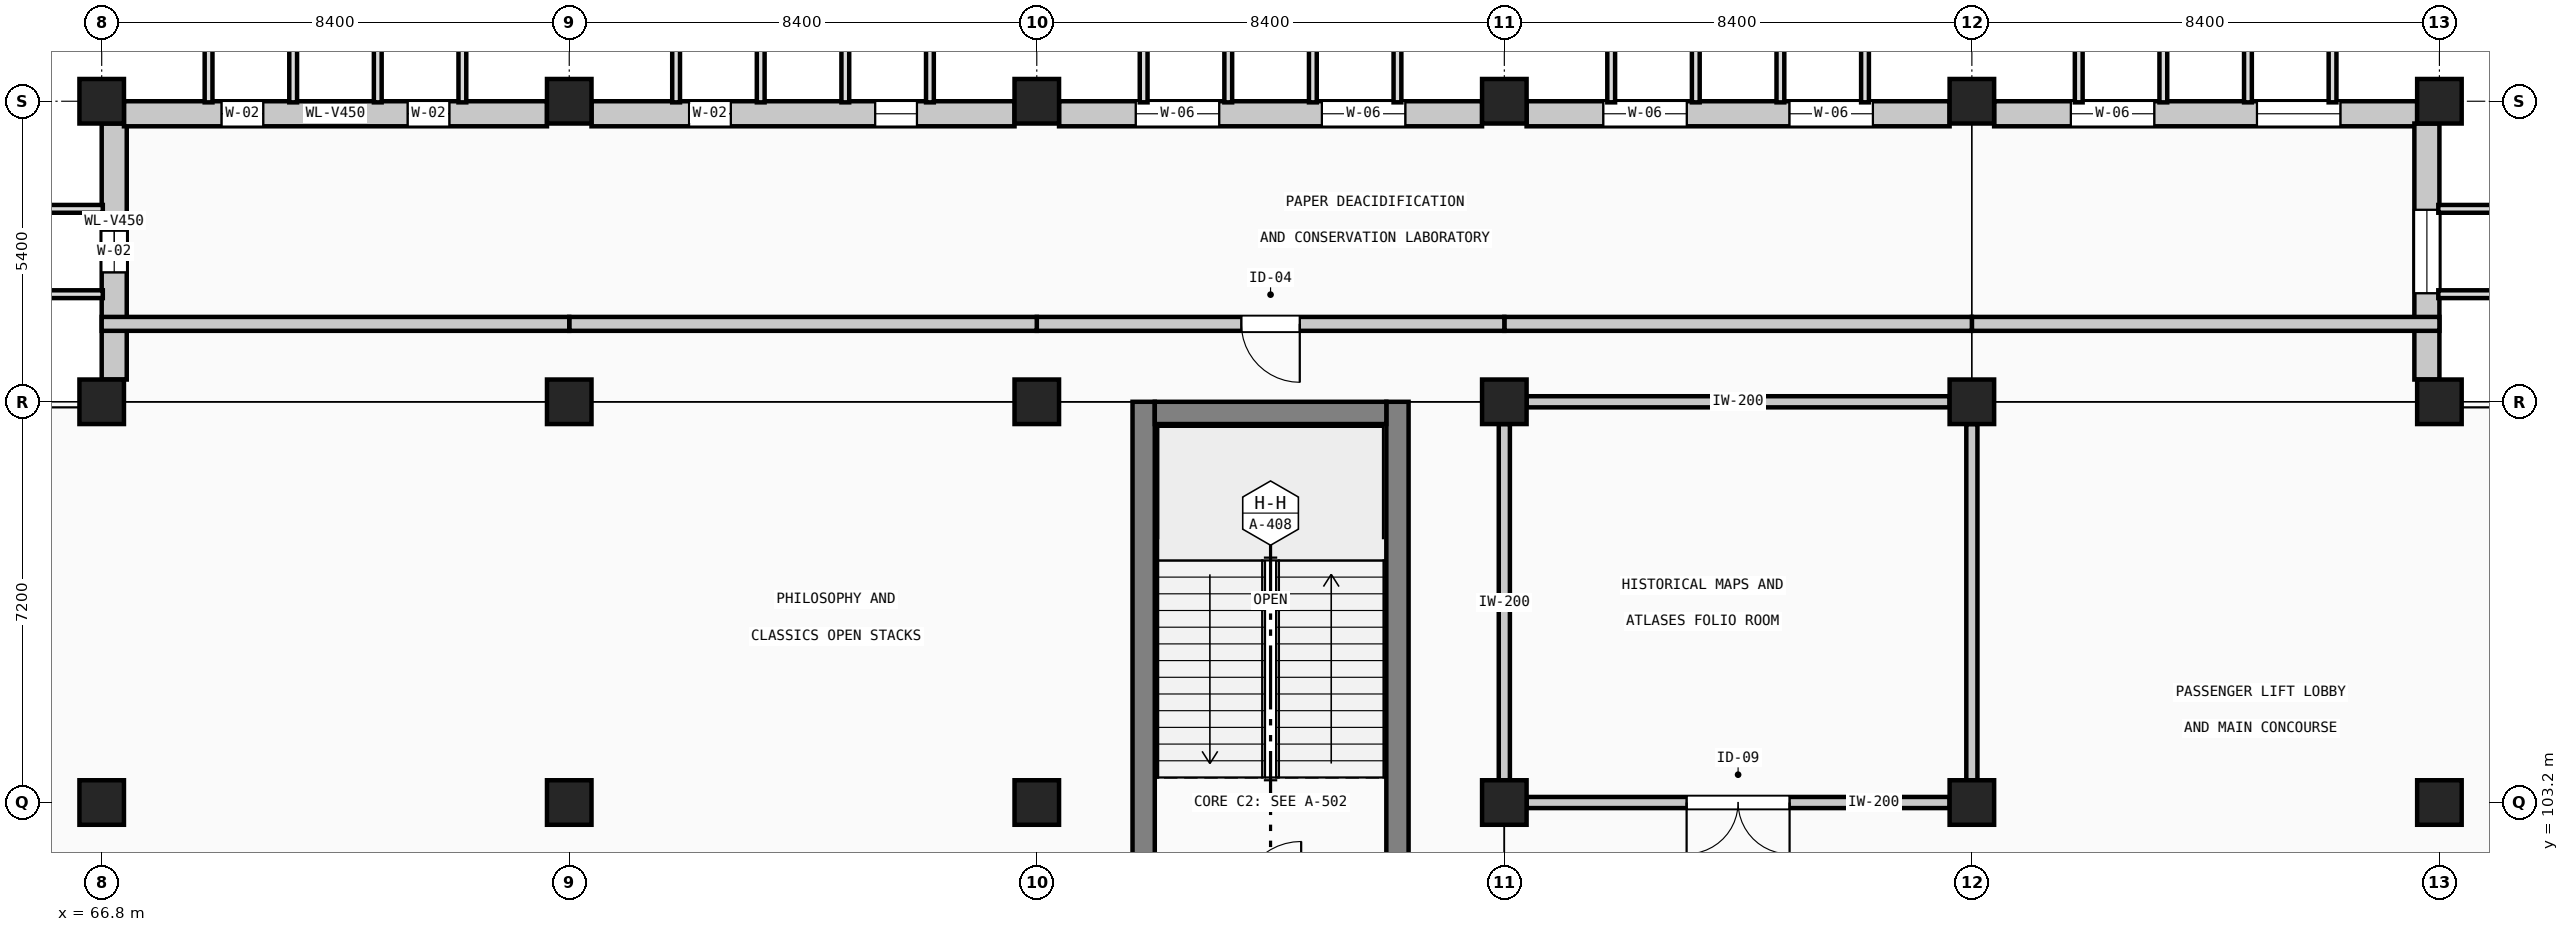
"""IFC4 building model, lengths in metres.
Left out: names, types, materials, properties, quantities, classifications, styles, units other than length and angle.
Written with IfcOpenShell. Run it as: python <this file> out.ifc"""

import sys

from ifc_helpers import new_model, si_unit, direction, frame, frame_2d, origin, origin_2d, place, context, subcontext, project, spatial, rectangle, extrude, element, fill, save


model = new_model("IFC4")
c1 = context("Model", 3, precision=1e-05, world=origin(), true_north=direction((0.0, 1.0)))
c2 = subcontext(c1, "Body", "Model", "MODEL_VIEW")
j1 = project(units=[si_unit("LENGTHUNIT", "METRE"), si_unit("PLANEANGLEUNIT", "RADIAN")], contexts=[c1])
p1 = place(None, origin())
s1 = spatial("IfcSite", under=j1, at=p1, CompositionType="ELEMENT")
p2 = place(p1, origin())
s2 = spatial("IfcBuilding", under=s1, at=p2, CompositionType="ELEMENT")
p3 = place(p2, frame((0.0, 0.0, 14.4)))
s3 = spatial("IfcBuildingStorey", under=s2, at=p3, CompositionType="ELEMENT", Elevation=14.4)
for number, where, z_axis, x_axis in (
    (1, (66.8, 103.2, 0.0), (0.0, 0.0, 1.0), (1.0, 0.0, 0.0)),
    (2, (66.8, 110.4, 0.0), (0.0, 0.0, 1.0), (1.0, 0.0, 0.0)),
    (3, (66.8, 115.8, 0.0), (0.0, 0.0, 1.0), (1.0, 0.0, 0.0)),
    (4, (75.2, 103.2, 0.0), (0.0, 0.0, 1.0), (1.0, 0.0, 0.0)),
    (5, (75.2, 110.4, 0.0), (0.0, 0.0, 1.0), (1.0, 0.0, 0.0)),
    (6, (75.2, 115.8, 0.0), (0.0, 0.0, 1.0), (1.0, 0.0, 0.0)),
    (7, (83.6, 103.2, 0.0), (0.0, 0.0, 1.0), (1.0, 0.0, 0.0)),
    (8, (83.6, 110.4, 0.0), (0.0, 0.0, 1.0), (1.0, 0.0, 0.0)),
    (9, (83.6, 115.8, 0.0), (0.0, 0.0, 1.0), (1.0, 0.0, 0.0)),
    (10, (92.0, 103.2, 0.0), (0.0, 0.0, 1.0), (1.0, 0.0, 0.0)),
    (11, (92.0, 110.4, 0.0), (0.0, 0.0, 1.0), (1.0, 0.0, 0.0)),
    (12, (92.0, 115.8, 0.0), (0.0, 0.0, 1.0), (1.0, 0.0, 0.0)),
    (13, (100.4, 103.2, 0.0), (0.0, 0.0, 1.0), (1.0, 0.0, 0.0)),
    (14, (100.4, 110.4, 0.0), (0.0, 0.0, 1.0), (1.0, 0.0, 0.0)),
    (15, (100.4, 115.8, 0.0), (0.0, 0.0, 1.0), (1.0, 0.0, 0.0)),
    (16, (108.8, 103.2, 0.0), (0.0, 0.0, 1.0), (1.0, 0.0, 0.0)),
    (17, (108.8, 110.4, 0.0), (0.0, 0.0, 1.0), (1.0, 0.0, 0.0)),
    (18, (108.8, 115.8, 0.0), (0.0, 0.0, 1.0), (1.0, 0.0, 0.0)),
):
    element("IfcColumn", number, at=place(p3, frame(where, z_axis=z_axis, x_axis=x_axis)), inside=s3, PredefinedType="COLUMN", context=c2, shape_type="SweptSolid", body=[
        extrude(rectangle(XDim=0.8, YDim=0.8, at=origin_2d()), origin(), (0.0, 0.0, 1.0), 4.48),
    ])
for number, where, z_axis, x_axis in (
    (19, (85.52, 101.2, 0.0), (0.0, 0.0, 1.0), (0.0, 1.0, 0.0)),
    (20, (90.08, 110.4, 0.0), (0.0, 0.0, 1.0), (0.0, -1.0, 0.0)),
):
    element("IfcWall", number, at=place(p3, frame(where, z_axis=z_axis, x_axis=x_axis)), inside=s3, PredefinedType="SHEAR", context=c2, shape_type="SweptSolid", body=[
        extrude(rectangle(XDim=9.2, YDim=0.4, at=frame_2d((4.6, 0.0))), origin(), (0.0, 0.0, 1.0), 4.18),
    ])
p4 = place(p3, frame((85.72, 110.2, 0.0), z_axis=(0.0, 0.0, 1.0), x_axis=(1.0, 0.0, 0.0)))
e21 = element("IfcWall", 21, at=p4, inside=s3, PredefinedType="SHEAR", context=c2, shape_type="SweptSolid", body=[
    extrude(rectangle(XDim=4.16, YDim=0.4, at=frame_2d((2.08, 0.0))), origin(), (0.0, 0.0, 1.0), 4.18),
])
p5 = place(p3, frame((67.025, 110.8, 0.0), z_axis=(0.0, 0.0, 1.0), x_axis=(0.0, 1.0, 0.0)))
e22 = element("IfcWall", 22, at=p5, inside=s3, PredefinedType="SOLIDWALL", context=c2, shape_type="SweptSolid", body=[
    extrude(rectangle(XDim=4.6, YDim=0.45, at=frame_2d((2.3, 0.0))), origin(), (0.0, 0.0, 1.0), 4.23),
])
p6 = place(p5, frame((1.925, 0.0, 0.9)))
e23 = element("IfcOpeningElement", 23, at=p6, cuts=e22, PredefinedType="OPENING", context=c2, shape_type="SweptSolid", body=[
    extrude(rectangle(XDim=0.75, YDim=2.4, at=frame_2d((0.375, 1.2))), frame((0.0, 0.235, 0.0), z_axis=(0.0, -1.0, 0.0), x_axis=(1.0, 0.0, 0.0)), (0.0, 0.0, 1.0), 0.47),
])
p7 = place(p3, frame((67.2, 115.575, 0.0), z_axis=(0.0, 0.0, 1.0), x_axis=(1.0, 0.0, 0.0)))
e24 = element("IfcWall", 24, at=p7, inside=s3, PredefinedType="SOLIDWALL", context=c2, shape_type="SweptSolid", body=[
    extrude(rectangle(XDim=7.6, YDim=0.45, at=frame_2d((3.8, 0.0))), origin(), (0.0, 0.0, 1.0), 4.23),
])
p8 = place(p7, frame((1.753, 0.0, 0.9)))
e25 = element("IfcOpeningElement", 25, at=p8, cuts=e24, PredefinedType="OPENING", context=c2, shape_type="SweptSolid", body=[
    extrude(rectangle(XDim=0.75, YDim=2.4, at=frame_2d((0.375, 1.2))), frame((0.0, 0.235, 0.0), z_axis=(0.0, -1.0, 0.0), x_axis=(1.0, 0.0, 0.0)), (0.0, 0.0, 1.0), 0.47),
])
p9 = place(p7, frame((5.097, 0.0, 0.9)))
e26 = element("IfcOpeningElement", 26, at=p9, cuts=e24, PredefinedType="OPENING", context=c2, shape_type="SweptSolid", body=[
    extrude(rectangle(XDim=0.75, YDim=2.4, at=frame_2d((0.375, 1.2))), frame((0.0, 0.235, 0.0), z_axis=(0.0, -1.0, 0.0), x_axis=(1.0, 0.0, 0.0)), (0.0, 0.0, 1.0), 0.47),
])
p10 = place(p3, frame((75.6, 115.575, 0.0), z_axis=(0.0, 0.0, 1.0), x_axis=(1.0, 0.0, 0.0)))
e27 = element("IfcWall", 27, at=p10, inside=s3, PredefinedType="SOLIDWALL", context=c2, shape_type="SweptSolid", body=[
    extrude(rectangle(XDim=7.6, YDim=0.45, at=frame_2d((3.8, 0.0))), origin(), (0.0, 0.0, 1.0), 4.23),
])
p11 = place(p10, frame((1.753, 0.0, 0.9)))
e28 = element("IfcOpeningElement", 28, at=p11, cuts=e27, PredefinedType="OPENING", context=c2, shape_type="SweptSolid", body=[
    extrude(rectangle(XDim=0.75, YDim=2.4, at=frame_2d((0.375, 1.2))), frame((0.0, 0.235, 0.0), z_axis=(0.0, -1.0, 0.0), x_axis=(1.0, 0.0, 0.0)), (0.0, 0.0, 1.0), 0.47),
])
p12 = place(p10, frame((5.097, 0.0, 0.9)))
e29 = element("IfcOpeningElement", 29, at=p12, cuts=e27, PredefinedType="OPENING", context=c2, shape_type="SweptSolid", body=[
    extrude(rectangle(XDim=0.75, YDim=2.4, at=frame_2d((0.375, 1.2))), frame((0.0, 0.235, 0.0), z_axis=(0.0, -1.0, 0.0), x_axis=(1.0, 0.0, 0.0)), (0.0, 0.0, 1.0), 0.47),
])
p13 = place(p3, frame((84.0, 115.575, 0.0), z_axis=(0.0, 0.0, 1.0), x_axis=(1.0, 0.0, 0.0)))
e30 = element("IfcWall", 30, at=p13, inside=s3, PredefinedType="SOLIDWALL", context=c2, shape_type="SweptSolid", body=[
    extrude(rectangle(XDim=7.6, YDim=0.45, at=frame_2d((3.8, 0.0))), origin(), (0.0, 0.0, 1.0), 4.23),
])
p14 = place(p13, frame((1.378, 0.0, 0.9)))
e31 = element("IfcOpeningElement", 31, at=p14, cuts=e30, PredefinedType="OPENING", context=c2, shape_type="SweptSolid", body=[
    extrude(rectangle(XDim=1.5, YDim=1.8, at=frame_2d((0.75, 0.9))), frame((0.0, 0.235, 0.0), z_axis=(0.0, -1.0, 0.0), x_axis=(1.0, 0.0, 0.0)), (0.0, 0.0, 1.0), 0.47),
])
p15 = place(p13, frame((4.722, 0.0, 0.9)))
e32 = element("IfcOpeningElement", 32, at=p15, cuts=e30, PredefinedType="OPENING", context=c2, shape_type="SweptSolid", body=[
    extrude(rectangle(XDim=1.5, YDim=1.8, at=frame_2d((0.75, 0.9))), frame((0.0, 0.235, 0.0), z_axis=(0.0, -1.0, 0.0), x_axis=(1.0, 0.0, 0.0)), (0.0, 0.0, 1.0), 0.47),
])
p16 = place(p3, frame((92.4, 115.575, 0.0), z_axis=(0.0, 0.0, 1.0), x_axis=(1.0, 0.0, 0.0)))
e33 = element("IfcWall", 33, at=p16, inside=s3, PredefinedType="SOLIDWALL", context=c2, shape_type="SweptSolid", body=[
    extrude(rectangle(XDim=7.6, YDim=0.45, at=frame_2d((3.8, 0.0))), origin(), (0.0, 0.0, 1.0), 4.23),
])
p17 = place(p16, frame((1.378, 0.0, 0.9)))
e34 = element("IfcOpeningElement", 34, at=p17, cuts=e33, PredefinedType="OPENING", context=c2, shape_type="SweptSolid", body=[
    extrude(rectangle(XDim=1.5, YDim=1.8, at=frame_2d((0.75, 0.9))), frame((0.0, 0.235, 0.0), z_axis=(0.0, -1.0, 0.0), x_axis=(1.0, 0.0, 0.0)), (0.0, 0.0, 1.0), 0.47),
])
p18 = place(p16, frame((4.722, 0.0, 0.9)))
e35 = element("IfcOpeningElement", 35, at=p18, cuts=e33, PredefinedType="OPENING", context=c2, shape_type="SweptSolid", body=[
    extrude(rectangle(XDim=1.5, YDim=1.8, at=frame_2d((0.75, 0.9))), frame((0.0, 0.235, 0.0), z_axis=(0.0, -1.0, 0.0), x_axis=(1.0, 0.0, 0.0)), (0.0, 0.0, 1.0), 0.47),
])
p19 = place(p3, frame((100.8, 115.575, 0.0), z_axis=(0.0, 0.0, 1.0), x_axis=(1.0, 0.0, 0.0)))
e36 = element("IfcWall", 36, at=p19, inside=s3, PredefinedType="SOLIDWALL", context=c2, shape_type="SweptSolid", body=[
    extrude(rectangle(XDim=7.6, YDim=0.45, at=frame_2d((3.8, 0.0))), origin(), (0.0, 0.0, 1.0), 4.23),
])
p20 = place(p19, frame((1.378, 0.0, 0.9)))
e37 = element("IfcOpeningElement", 37, at=p20, cuts=e36, PredefinedType="OPENING", context=c2, shape_type="SweptSolid", body=[
    extrude(rectangle(XDim=1.5, YDim=1.8, at=frame_2d((0.75, 0.9))), frame((0.0, 0.235, 0.0), z_axis=(0.0, -1.0, 0.0), x_axis=(1.0, 0.0, 0.0)), (0.0, 0.0, 1.0), 0.47),
])
p21 = place(p19, frame((4.722, 0.0, 0.9)))
e38 = element("IfcOpeningElement", 38, at=p21, cuts=e36, PredefinedType="OPENING", context=c2, shape_type="SweptSolid", body=[
    extrude(rectangle(XDim=1.5, YDim=1.8, at=frame_2d((0.75, 0.9))), frame((0.0, 0.235, 0.0), z_axis=(0.0, -1.0, 0.0), x_axis=(1.0, 0.0, 0.0)), (0.0, 0.0, 1.0), 0.47),
])
p22 = place(p3, frame((108.575, 115.4, 0.0), z_axis=(0.0, 0.0, 1.0), x_axis=(0.0, -1.0, 0.0)))
e39 = element("IfcWall", 39, at=p22, inside=s3, PredefinedType="SOLIDWALL", context=c2, shape_type="SweptSolid", body=[
    extrude(rectangle(XDim=4.6, YDim=0.45, at=frame_2d((2.3, 0.0))), origin(), (0.0, 0.0, 1.0), 4.23),
])
p23 = place(p22, frame((1.55, 0.0, 0.9)))
e40 = element("IfcOpeningElement", 40, at=p23, cuts=e39, PredefinedType="OPENING", context=c2, shape_type="SweptSolid", body=[
    extrude(rectangle(XDim=1.5, YDim=1.8, at=frame_2d((0.75, 0.9))), frame((0.0, 0.235, 0.0), z_axis=(0.0, -1.0, 0.0), x_axis=(1.0, 0.0, 0.0)), (0.0, 0.0, 1.0), 0.47),
])
p24 = place(p3, frame((108.8, 111.8, 0.0), z_axis=(0.0, 0.0, 1.0), x_axis=(-1.0, 0.0, 0.0)))
e41 = element("IfcWall", 41, at=p24, inside=s3, PredefinedType="SOLIDWALL", context=c2, shape_type="SweptSolid", body=[
    extrude(rectangle(XDim=8.4, YDim=0.25, at=frame_2d((4.2, 0.0))), origin(), (0.0, 0.0, 1.0), 4.23),
])
p25 = place(p3, frame((100.4, 111.8, 0.0), z_axis=(0.0, 0.0, 1.0), x_axis=(-1.0, 0.0, 0.0)))
e42 = element("IfcWall", 42, at=p25, inside=s3, PredefinedType="SOLIDWALL", context=c2, shape_type="SweptSolid", body=[
    extrude(rectangle(XDim=8.4, YDim=0.25, at=frame_2d((4.2, 0.0))), origin(), (0.0, 0.0, 1.0), 4.23),
])
p26 = place(p3, frame((92.0, 111.8, 0.0), z_axis=(0.0, 0.0, 1.0), x_axis=(-1.0, 0.0, 0.0)))
e43 = element("IfcWall", 43, at=p26, inside=s3, PredefinedType="SOLIDWALL", context=c2, shape_type="SweptSolid", body=[
    extrude(rectangle(XDim=8.4, YDim=0.25, at=frame_2d((4.2, 0.0))), origin(), (0.0, 0.0, 1.0), 4.23),
])
p27 = place(p26, frame((3.675, 0.0, 0.0)))
e44 = element("IfcOpeningElement", 44, at=p27, cuts=e43, PredefinedType="OPENING", context=c2, shape_type="SweptSolid", body=[
    extrude(rectangle(XDim=1.05, YDim=2.2, at=frame_2d((0.525, 1.1))), frame((0.0, 0.135, 0.0), z_axis=(0.0, -1.0, 0.0), x_axis=(1.0, 0.0, 0.0)), (0.0, 0.0, 1.0), 0.27),
])
p28 = place(p3, frame((83.6, 111.8, 0.0), z_axis=(0.0, 0.0, 1.0), x_axis=(-1.0, 0.0, 0.0)))
e45 = element("IfcWall", 45, at=p28, inside=s3, PredefinedType="SOLIDWALL", context=c2, shape_type="SweptSolid", body=[
    extrude(rectangle(XDim=8.4, YDim=0.25, at=frame_2d((4.2, 0.0))), origin(), (0.0, 0.0, 1.0), 4.23),
])
p29 = place(p3, frame((75.2, 111.8, 0.0), z_axis=(0.0, 0.0, 1.0), x_axis=(-1.0, 0.0, 0.0)))
e46 = element("IfcWall", 46, at=p29, inside=s3, PredefinedType="SOLIDWALL", context=c2, shape_type="SweptSolid", body=[
    extrude(rectangle(XDim=8.4, YDim=0.25, at=frame_2d((4.2, 0.0))), origin(), (0.0, 0.0, 1.0), 4.23),
])
p30 = place(p3, frame((100.0, 103.2, 0.0), z_axis=(0.0, 0.0, 1.0), x_axis=(-1.0, 0.0, 0.0)))
e47 = element("IfcWall", 47, at=p30, inside=s3, PredefinedType="PARTITIONING", context=c2, shape_type="SweptSolid", body=[
    extrude(rectangle(XDim=7.6, YDim=0.2, at=frame_2d((3.8, 0.0))), origin(), (0.0, 0.0, 1.0), 3.43),
])
p31 = place(p30, frame((2.875, 0.0, 0.0)))
e48 = element("IfcOpeningElement", 48, at=p31, cuts=e47, PredefinedType="OPENING", context=c2, shape_type="SweptSolid", body=[
    extrude(rectangle(XDim=1.85, YDim=2.3, at=frame_2d((0.925, 1.15))), frame((0.0, 0.11, 0.0), z_axis=(0.0, -1.0, 0.0), x_axis=(1.0, 0.0, 0.0)), (0.0, 0.0, 1.0), 0.22),
])
p32 = place(p3, frame((92.4, 110.4, 0.0), z_axis=(0.0, 0.0, 1.0), x_axis=(1.0, 0.0, 0.0)))
e49 = element("IfcWall", 49, at=p32, inside=s3, PredefinedType="PARTITIONING", context=c2, shape_type="SweptSolid", body=[
    extrude(rectangle(XDim=7.6, YDim=0.2, at=frame_2d((3.8, 0.0))), origin(), (0.0, 0.0, 1.0), 3.43),
])
for number, where, z_axis, x_axis in (
    (50, (92.0, 103.6, 0.0), (0.0, 0.0, 1.0), (0.0, 1.0, 0.0)),
    (51, (100.4, 110.0, 0.0), (0.0, 0.0, 1.0), (0.0, -1.0, 0.0)),
):
    element("IfcWall", number, at=place(p3, frame(where, z_axis=z_axis, x_axis=x_axis)), inside=s3, PredefinedType="PARTITIONING", context=c2, shape_type="SweptSolid", body=[
        extrude(rectangle(XDim=6.4, YDim=0.2, at=frame_2d((3.2, 0.0))), origin(), (0.0, 0.0, 1.0), 3.53),
    ])
p33 = place(p6, origin())
e52 = element("IfcWindow", 52, at=p33, inside=s3, PartitioningType="SINGLE_PANEL", PredefinedType="WINDOW", context=c2, shape_type="SweptSolid", body=[
    extrude(rectangle(XDim=0.75, YDim=2.4, at=frame_2d((0.375, 1.2))), frame((0.0, 0.03, 0.0), z_axis=(0.0, -1.0, 0.0), x_axis=(1.0, 0.0, 0.0)), (0.0, 0.0, 1.0), 0.06),
])
fill(e23, e52)
p34 = place(p8, origin())
e53 = element("IfcWindow", 53, at=p34, inside=s3, PartitioningType="SINGLE_PANEL", PredefinedType="WINDOW", context=c2, shape_type="SweptSolid", body=[
    extrude(rectangle(XDim=0.75, YDim=2.4, at=frame_2d((0.375, 1.2))), frame((0.0, 0.03, 0.0), z_axis=(0.0, -1.0, 0.0), x_axis=(1.0, 0.0, 0.0)), (0.0, 0.0, 1.0), 0.06),
])
fill(e25, e53)
p35 = place(p9, origin())
e54 = element("IfcWindow", 54, at=p35, inside=s3, PartitioningType="SINGLE_PANEL", PredefinedType="WINDOW", context=c2, shape_type="SweptSolid", body=[
    extrude(rectangle(XDim=0.75, YDim=2.4, at=frame_2d((0.375, 1.2))), frame((0.0, 0.03, 0.0), z_axis=(0.0, -1.0, 0.0), x_axis=(1.0, 0.0, 0.0)), (0.0, 0.0, 1.0), 0.06),
])
fill(e26, e54)
p36 = place(p11, origin())
e55 = element("IfcWindow", 55, at=p36, inside=s3, PartitioningType="SINGLE_PANEL", PredefinedType="WINDOW", context=c2, shape_type="SweptSolid", body=[
    extrude(rectangle(XDim=0.75, YDim=2.4, at=frame_2d((0.375, 1.2))), frame((0.0, 0.03, 0.0), z_axis=(0.0, -1.0, 0.0), x_axis=(1.0, 0.0, 0.0)), (0.0, 0.0, 1.0), 0.06),
])
fill(e28, e55)
p37 = place(p12, origin())
e56 = element("IfcWindow", 56, at=p37, inside=s3, PartitioningType="SINGLE_PANEL", PredefinedType="WINDOW", context=c2, shape_type="SweptSolid", body=[
    extrude(rectangle(XDim=0.75, YDim=2.4, at=frame_2d((0.375, 1.2))), frame((0.0, 0.03, 0.0), z_axis=(0.0, -1.0, 0.0), x_axis=(1.0, 0.0, 0.0)), (0.0, 0.0, 1.0), 0.06),
])
fill(e29, e56)
p38 = place(p14, origin())
e57 = element("IfcWindow", 57, at=p38, inside=s3, PartitioningType="SINGLE_PANEL", PredefinedType="WINDOW", context=c2, shape_type="SweptSolid", body=[
    extrude(rectangle(XDim=1.5, YDim=1.8, at=frame_2d((0.75, 0.9))), frame((0.0, 0.03, 0.0), z_axis=(0.0, -1.0, 0.0), x_axis=(1.0, 0.0, 0.0)), (0.0, 0.0, 1.0), 0.06),
])
fill(e31, e57)
p39 = place(p15, origin())
e58 = element("IfcWindow", 58, at=p39, inside=s3, PartitioningType="SINGLE_PANEL", PredefinedType="WINDOW", context=c2, shape_type="SweptSolid", body=[
    extrude(rectangle(XDim=1.5, YDim=1.8, at=frame_2d((0.75, 0.9))), frame((0.0, 0.03, 0.0), z_axis=(0.0, -1.0, 0.0), x_axis=(1.0, 0.0, 0.0)), (0.0, 0.0, 1.0), 0.06),
])
fill(e32, e58)
p40 = place(p17, origin())
e59 = element("IfcWindow", 59, at=p40, inside=s3, PartitioningType="SINGLE_PANEL", PredefinedType="WINDOW", context=c2, shape_type="SweptSolid", body=[
    extrude(rectangle(XDim=1.5, YDim=1.8, at=frame_2d((0.75, 0.9))), frame((0.0, 0.03, 0.0), z_axis=(0.0, -1.0, 0.0), x_axis=(1.0, 0.0, 0.0)), (0.0, 0.0, 1.0), 0.06),
])
fill(e34, e59)
p41 = place(p18, origin())
e60 = element("IfcWindow", 60, at=p41, inside=s3, PartitioningType="SINGLE_PANEL", PredefinedType="WINDOW", context=c2, shape_type="SweptSolid", body=[
    extrude(rectangle(XDim=1.5, YDim=1.8, at=frame_2d((0.75, 0.9))), frame((0.0, 0.03, 0.0), z_axis=(0.0, -1.0, 0.0), x_axis=(1.0, 0.0, 0.0)), (0.0, 0.0, 1.0), 0.06),
])
fill(e35, e60)
p42 = place(p20, origin())
e61 = element("IfcWindow", 61, at=p42, inside=s3, PartitioningType="SINGLE_PANEL", PredefinedType="WINDOW", context=c2, shape_type="SweptSolid", body=[
    extrude(rectangle(XDim=1.5, YDim=1.8, at=frame_2d((0.75, 0.9))), frame((0.0, 0.03, 0.0), z_axis=(0.0, -1.0, 0.0), x_axis=(1.0, 0.0, 0.0)), (0.0, 0.0, 1.0), 0.06),
])
fill(e37, e61)
p43 = place(p21, origin())
e62 = element("IfcWindow", 62, at=p43, inside=s3, PartitioningType="SINGLE_PANEL", PredefinedType="WINDOW", context=c2, shape_type="SweptSolid", body=[
    extrude(rectangle(XDim=1.5, YDim=1.8, at=frame_2d((0.75, 0.9))), frame((0.0, 0.03, 0.0), z_axis=(0.0, -1.0, 0.0), x_axis=(1.0, 0.0, 0.0)), (0.0, 0.0, 1.0), 0.06),
])
fill(e38, e62)
p44 = place(p23, origin())
e63 = element("IfcWindow", 63, at=p44, inside=s3, PartitioningType="SINGLE_PANEL", PredefinedType="WINDOW", context=c2, shape_type="SweptSolid", body=[
    extrude(rectangle(XDim=1.5, YDim=1.8, at=frame_2d((0.75, 0.9))), frame((0.0, 0.03, 0.0), z_axis=(0.0, -1.0, 0.0), x_axis=(1.0, 0.0, 0.0)), (0.0, 0.0, 1.0), 0.06),
])
fill(e40, e63)
p45 = place(p27, origin())
e64 = element("IfcDoor", 64, at=p45, inside=s3, OperationType="SINGLE_SWING_LEFT", PredefinedType="DOOR", context=c2, shape_type="SweptSolid", body=[
    extrude(rectangle(XDim=1.05, YDim=2.2, at=frame_2d((0.525, 1.1))), frame((0.0, 0.025, 0.0), z_axis=(0.0, -1.0, 0.0), x_axis=(1.0, 0.0, 0.0)), (0.0, 0.0, 1.0), 0.05),
])
fill(e44, e64)
p46 = place(p31, origin())
e65 = element("IfcDoor", 65, at=p46, inside=s3, OperationType="DOUBLE_DOOR_SINGLE_SWING", PredefinedType="DOOR", context=c2, shape_type="SweptSolid", body=[
    extrude(rectangle(XDim=1.85, YDim=2.3, at=frame_2d((0.925, 1.15))), frame((0.0, 0.025, 0.0), z_axis=(0.0, -1.0, 0.0), x_axis=(1.0, 0.0, 0.0)), (0.0, 0.0, 1.0), 0.05),
])
fill(e48, e65)
save(model, sys.argv[1])
